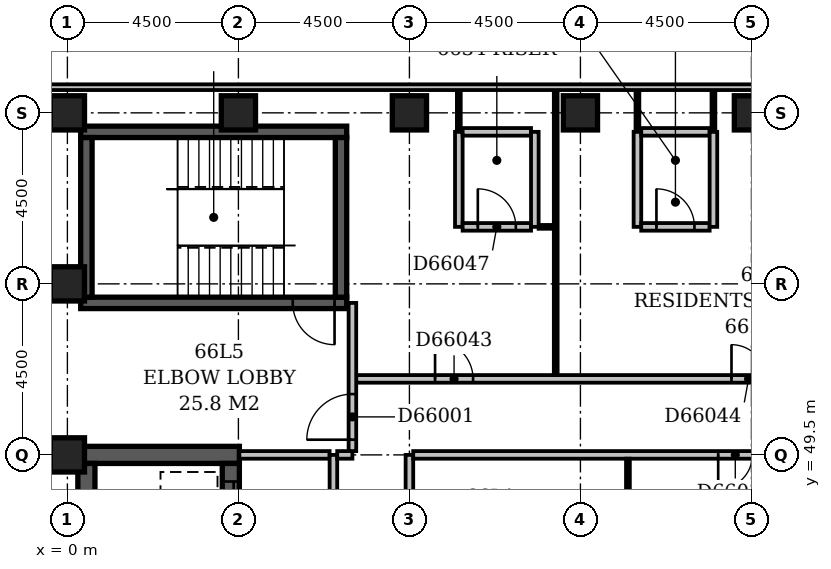
"""IFC4 building model, lengths in metres.
Left out: names, types, materials, properties, quantities, classifications, styles, units other than length and angle.
Written with IfcOpenShell. Run it as: python <this file> out.ifc"""

import sys

from ifc_helpers import new_model, si_unit, direction, frame, frame_2d, origin, origin_2d, place, context, subcontext, project, spatial, rectangle, extrude, element, fill, save


model = new_model("IFC4")
c1 = context("Model", 3, precision=1e-05, world=origin(), true_north=direction((0.0, 1.0)))
c2 = subcontext(c1, "Body", "Model", "MODEL_VIEW")
j1 = project(units=[si_unit("LENGTHUNIT", "METRE"), si_unit("PLANEANGLEUNIT", "RADIAN")], contexts=[c1])
p1 = place(None, origin())
s1 = spatial("IfcSite", under=j1, at=p1, CompositionType="ELEMENT")
p2 = place(p1, origin())
s2 = spatial("IfcBuilding", under=s1, at=p2, CompositionType="ELEMENT")
p3 = place(p2, frame((0.0, 0.0, 254.6)))
s3 = spatial("IfcBuildingStorey", under=s2, at=p3, CompositionType="ELEMENT", Elevation=254.6)
p4 = place(p3, frame((0.275, 49.5, -0.3), z_axis=(0.0, 0.0, 1.0), x_axis=(1.0, 0.0, 0.0)))
e1 = element("IfcWall", 1, at=p4, inside=s3, PredefinedType="SHEAR", context=c2, shape_type="SweptSolid", body=[
    extrude(rectangle(XDim=4.25, YDim=0.45, at=frame_2d((2.125, 0.0))), origin(), (0.0, 0.0, 1.0), 3.45),
])
p5 = place(p3, frame((0.35, 53.5, -0.3), z_axis=(0.0, 0.0, 1.0), x_axis=(1.0, 0.0, 0.0)))
e2 = element("IfcWall", 2, at=p5, inside=s3, PredefinedType="SHEAR", context=c2, shape_type="SweptSolid", body=[
    extrude(rectangle(XDim=7.0, YDim=0.3, at=frame_2d((3.5, 0.0))), origin(), (0.0, 0.0, 1.0), 3.45),
])
p6 = place(p5, frame((5.58, 0.0, 0.3)))
e3 = element("IfcOpeningElement", 3, at=p6, cuts=e2, PredefinedType="OPENING", context=c2, shape_type="SweptSolid", body=[
    extrude(rectangle(XDim=1.1, YDim=2.1, at=frame_2d((0.55, 1.05))), frame((0.0, 0.162, 0.0), z_axis=(0.0, -1.0, 0.0), x_axis=(1.0, 0.0, 0.0)), (0.0, 0.0, 1.0), 0.324),
])
p7 = place(p3, frame((0.35, 58.0, -0.3), z_axis=(0.0, 0.0, 1.0), x_axis=(1.0, 0.0, 0.0)))
e4 = element("IfcWall", 4, at=p7, inside=s3, PredefinedType="SHEAR", context=c2, shape_type="SweptSolid", body=[
    extrude(rectangle(XDim=7.0, YDim=0.3, at=frame_2d((3.5, 0.0))), origin(), (0.0, 0.0, 1.0), 3.45),
])
p8 = place(p3, frame((0.5, 27.15, -0.3), z_axis=(0.0, 0.0, 1.0), x_axis=(0.0, 1.0, 0.0)))
e5 = element("IfcWall", 5, at=p8, inside=s3, PredefinedType="SHEAR", context=c2, shape_type="SweptSolid", body=[
    extrude(rectangle(XDim=22.125, YDim=0.45, at=frame_2d((11.062, 0.0))), origin(), (0.0, 0.0, 1.0), 3.45),
])
p9 = place(p3, frame((0.5, 53.65, -0.3), z_axis=(0.0, 0.0, 1.0), x_axis=(0.0, 1.0, 0.0)))
e6 = element("IfcWall", 6, at=p9, inside=s3, PredefinedType="SHEAR", context=c2, shape_type="SweptSolid", body=[
    extrude(rectangle(XDim=4.2, YDim=0.3, at=frame_2d((2.1, 0.0))), origin(), (0.0, 0.0, 1.0), 3.45),
])
p10 = place(p3, frame((4.3, 27.15, -0.3), z_axis=(0.0, 0.0, 1.0), x_axis=(0.0, 1.0, 0.0)))
e7 = element("IfcWall", 7, at=p10, inside=s3, PredefinedType="SHEAR", context=c2, shape_type="SweptSolid", body=[
    extrude(rectangle(XDim=22.125, YDim=0.45, at=frame_2d((11.062, 0.0))), origin(), (0.0, 0.0, 1.0), 3.45),
])
p11 = place(p10, frame((3.05, 0.0, 0.3)))
e8 = element("IfcOpeningElement", 8, at=p11, cuts=e7, PredefinedType="OPENING", context=c2, shape_type="SweptSolid", body=[
    extrude(rectangle(XDim=1.1, YDim=2.1, at=frame_2d((0.55, 1.05))), frame((0.0, 0.237, 0.0), z_axis=(0.0, -1.0, 0.0), x_axis=(1.0, 0.0, 0.0)), (0.0, 0.0, 1.0), 0.474),
])
p12 = place(p10, frame((0.55, 0.0, 0.3)))
e9 = element("IfcOpeningElement", 9, at=p12, cuts=e7, PredefinedType="OPENING", context=c2, shape_type="SweptSolid", body=[
    extrude(rectangle(XDim=1.1, YDim=2.1, at=frame_2d((0.55, 1.05))), frame((0.0, 0.237, 0.0), z_axis=(0.0, -1.0, 0.0), x_axis=(1.0, 0.0, 0.0)), (0.0, 0.0, 1.0), 0.474),
])
p13 = place(p10, frame((20.55, 0.0, 0.3)))
e10 = element("IfcOpeningElement", 10, at=p13, cuts=e7, PredefinedType="OPENING", context=c2, shape_type="SweptSolid", body=[
    extrude(rectangle(XDim=1.1, YDim=2.1, at=frame_2d((0.55, 1.05))), frame((0.0, 0.237, 0.0), z_axis=(0.0, -1.0, 0.0), x_axis=(1.0, 0.0, 0.0)), (0.0, 0.0, 1.0), 0.474),
])
p14 = place(p10, frame((18.05, 0.0, 0.3)))
e11 = element("IfcOpeningElement", 11, at=p14, cuts=e7, PredefinedType="OPENING", context=c2, shape_type="SweptSolid", body=[
    extrude(rectangle(XDim=1.1, YDim=2.1, at=frame_2d((0.55, 1.05))), frame((0.0, 0.237, 0.0), z_axis=(0.0, -1.0, 0.0), x_axis=(1.0, 0.0, 0.0)), (0.0, 0.0, 1.0), 0.474),
])
p15 = place(p10, frame((15.55, 0.0, 0.3)))
e12 = element("IfcOpeningElement", 12, at=p15, cuts=e7, PredefinedType="OPENING", context=c2, shape_type="SweptSolid", body=[
    extrude(rectangle(XDim=1.1, YDim=2.1, at=frame_2d((0.55, 1.05))), frame((0.0, 0.237, 0.0), z_axis=(0.0, -1.0, 0.0), x_axis=(1.0, 0.0, 0.0)), (0.0, 0.0, 1.0), 0.474),
])
p16 = place(p10, frame((13.05, 0.0, 0.3)))
e13 = element("IfcOpeningElement", 13, at=p16, cuts=e7, PredefinedType="OPENING", context=c2, shape_type="SweptSolid", body=[
    extrude(rectangle(XDim=1.1, YDim=2.1, at=frame_2d((0.55, 1.05))), frame((0.0, 0.237, 0.0), z_axis=(0.0, -1.0, 0.0), x_axis=(1.0, 0.0, 0.0)), (0.0, 0.0, 1.0), 0.474),
])
p17 = place(p10, frame((10.55, 0.0, 0.3)))
e14 = element("IfcOpeningElement", 14, at=p17, cuts=e7, PredefinedType="OPENING", context=c2, shape_type="SweptSolid", body=[
    extrude(rectangle(XDim=1.1, YDim=2.1, at=frame_2d((0.55, 1.05))), frame((0.0, 0.237, 0.0), z_axis=(0.0, -1.0, 0.0), x_axis=(1.0, 0.0, 0.0)), (0.0, 0.0, 1.0), 0.474),
])
p18 = place(p10, frame((8.05, 0.0, 0.3)))
e15 = element("IfcOpeningElement", 15, at=p18, cuts=e7, PredefinedType="OPENING", context=c2, shape_type="SweptSolid", body=[
    extrude(rectangle(XDim=1.1, YDim=2.1, at=frame_2d((0.55, 1.05))), frame((0.0, 0.237, 0.0), z_axis=(0.0, -1.0, 0.0), x_axis=(1.0, 0.0, 0.0)), (0.0, 0.0, 1.0), 0.474),
])
p19 = place(p10, frame((5.55, 0.0, 0.3)))
e16 = element("IfcOpeningElement", 16, at=p19, cuts=e7, PredefinedType="OPENING", context=c2, shape_type="SweptSolid", body=[
    extrude(rectangle(XDim=1.1, YDim=2.1, at=frame_2d((0.55, 1.05))), frame((0.0, 0.237, 0.0), z_axis=(0.0, -1.0, 0.0), x_axis=(1.0, 0.0, 0.0)), (0.0, 0.0, 1.0), 0.474),
])
p20 = place(p3, frame((7.2, 53.65, -0.3), z_axis=(0.0, 0.0, 1.0), x_axis=(0.0, 1.0, 0.0)))
e17 = element("IfcWall", 17, at=p20, inside=s3, PredefinedType="SHEAR", context=c2, shape_type="SweptSolid", body=[
    extrude(rectangle(XDim=4.2, YDim=0.3, at=frame_2d((2.1, 0.0))), origin(), (0.0, 0.0, 1.0), 3.45),
])
for number, where, z_axis, x_axis in (
    (18, (0.0, 49.5, -0.3), (0.0, 0.0, 1.0), (1.0, 0.0, 0.0)),
    (19, (0.0, 54.0, -0.3), (0.0, 0.0, 1.0), (1.0, 0.0, 0.0)),
    (20, (0.0, 58.5, -0.3), (0.0, 0.0, 1.0), (1.0, 0.0, 0.0)),
    (21, (4.5, 58.5, -0.3), (0.0, 0.0, 1.0), (1.0, 0.0, 0.0)),
    (22, (9.0, 58.5, -0.3), (0.0, 0.0, 1.0), (1.0, 0.0, 0.0)),
    (23, (13.5, 58.5, -0.3), (0.0, 0.0, 1.0), (1.0, 0.0, 0.0)),
    (24, (18.0, 58.5, -0.3), (0.0, 0.0, 1.0), (1.0, 0.0, 0.0)),
):
    element("IfcColumn", number, at=place(p3, frame(where, z_axis=z_axis, x_axis=x_axis)), inside=s3, PredefinedType="COLUMN", context=c2, shape_type="SweptSolid", body=[
        extrude(rectangle(XDim=0.9, YDim=0.9, at=origin_2d()), origin(), (0.0, 0.0, 1.0), 3.45),
    ])
p21 = place(p3, frame((45.6, 59.175, 0.0), z_axis=(0.0, 0.0, 1.0), x_axis=(-1.0, 0.0, 0.0)))
e25 = element("IfcWall", 25, at=p21, inside=s3, PredefinedType="STANDARD", context=c2, shape_type="SweptSolid", body=[
    extrude(rectangle(XDim=46.35, YDim=0.15, at=frame_2d((23.175, 0.0))), origin(), (0.0, 0.0, 1.0), 2.7),
])
p22 = place(p21, frame((15.734, 0.0, 0.6)))
e26 = element("IfcOpeningElement", 26, at=p22, cuts=e25, PredefinedType="OPENING", context=c2, shape_type="SweptSolid", body=[
    extrude(rectangle(XDim=2.1, YDim=1.8, at=frame_2d((1.05, 0.9))), frame((0.0, 0.087, 0.0), z_axis=(0.0, -1.0, 0.0), x_axis=(1.0, 0.0, 0.0)), (0.0, 0.0, 1.0), 0.174),
])
p23 = place(p3, frame((7.0, 34.6, 0.0), z_axis=(0.0, 0.0, 1.0), x_axis=(0.0, 1.0, 0.0)))
e27 = element("IfcWall", 27, at=p23, inside=s3, PredefinedType="PARTITIONING", context=c2, shape_type="SweptSolid", body=[
    extrude(rectangle(XDim=14.9, YDim=0.2, at=frame_2d((7.45, 0.0))), origin(), (0.0, 0.0, 1.0), 3.15),
])
p24 = place(p23, frame((2.8, 0.0, 0.0)))
e28 = element("IfcOpeningElement", 28, at=p24, cuts=e27, PredefinedType="OPENING", context=c2, shape_type="SweptSolid", body=[
    extrude(rectangle(XDim=1.2, YDim=2.1, at=frame_2d((0.6, 1.05))), frame((0.0, 0.112, 0.0), z_axis=(0.0, -1.0, 0.0), x_axis=(1.0, 0.0, 0.0)), (0.0, 0.0, 1.0), 0.224),
])
p25 = place(p23, frame((9.8, 0.0, 0.0)))
e29 = element("IfcOpeningElement", 29, at=p25, cuts=e27, PredefinedType="OPENING", context=c2, shape_type="SweptSolid", body=[
    extrude(rectangle(XDim=1.2, YDim=2.1, at=frame_2d((0.6, 1.05))), frame((0.0, 0.112, 0.0), z_axis=(0.0, -1.0, 0.0), x_axis=(1.0, 0.0, 0.0)), (0.0, 0.0, 1.0), 0.224),
])
p26 = place(p3, frame((4.525, 49.5, 0.0), z_axis=(0.0, 0.0, 1.0), x_axis=(1.0, 0.0, 0.0)))
e30 = element("IfcWall", 30, at=p26, inside=s3, PredefinedType="PARTITIONING", context=c2, shape_type="SweptSolid", body=[
    extrude(rectangle(XDim=2.375, YDim=0.2, at=frame_2d((1.188, 0.0))), origin(), (0.0, 0.0, 1.0), 3.15),
])
p27 = place(p3, frame((7.1, 49.5, 0.0), z_axis=(0.0, 0.0, 1.0), x_axis=(1.0, 0.0, 0.0)))
e31 = element("IfcWall", 31, at=p27, inside=s3, PredefinedType="PARTITIONING", context=c2, shape_type="SweptSolid", body=[
    extrude(rectangle(XDim=0.4, YDim=0.2, at=frame_2d((0.2, 0.0))), origin(), (0.0, 0.0, 1.0), 3.15),
])
p28 = place(p3, frame((7.5, 49.6, 0.0), z_axis=(0.0, 0.0, 1.0), x_axis=(0.0, 1.0, 0.0)))
e32 = element("IfcWall", 32, at=p28, inside=s3, PredefinedType="PARTITIONING", context=c2, shape_type="SweptSolid", body=[
    extrude(rectangle(XDim=3.9, YDim=0.2, at=frame_2d((1.95, 0.0))), origin(), (0.0, 0.0, 1.0), 3.15),
])
p29 = place(p28, frame((0.3, 0.0, 0.0)))
e33 = element("IfcOpeningElement", 33, at=p29, cuts=e32, PredefinedType="OPENING", context=c2, shape_type="SweptSolid", body=[
    extrude(rectangle(XDim=1.2, YDim=2.1, at=frame_2d((0.6, 1.05))), frame((0.0, 0.112, 0.0), z_axis=(0.0, -1.0, 0.0), x_axis=(1.0, 0.0, 0.0)), (0.0, 0.0, 1.0), 0.224),
])
p30 = place(p3, frame((9.0, 38.0, 0.0), z_axis=(0.0, 0.0, 1.0), x_axis=(0.0, 1.0, 0.0)))
e34 = element("IfcWall", 34, at=p30, inside=s3, PredefinedType="PARTITIONING", context=c2, shape_type="SweptSolid", body=[
    extrude(rectangle(XDim=11.5, YDim=0.2, at=frame_2d((5.75, 0.0))), origin(), (0.0, 0.0, 1.0), 3.15),
])
p31 = place(p30, frame((1.5, 0.0, 0.0)))
e35 = element("IfcOpeningElement", 35, at=p31, cuts=e34, PredefinedType="OPENING", context=c2, shape_type="SweptSolid", body=[
    extrude(rectangle(XDim=0.9, YDim=2.1, at=frame_2d((0.45, 1.05))), frame((0.0, 0.112, 0.0), z_axis=(0.0, -1.0, 0.0), x_axis=(1.0, 0.0, 0.0)), (0.0, 0.0, 1.0), 0.224),
])
p32 = place(p30, frame((7.25, 0.0, 0.0)))
e36 = element("IfcOpeningElement", 36, at=p32, cuts=e34, PredefinedType="OPENING", context=c2, shape_type="SweptSolid", body=[
    extrude(rectangle(XDim=0.9, YDim=2.1, at=frame_2d((0.45, 1.05))), frame((0.0, 0.112, 0.0), z_axis=(0.0, -1.0, 0.0), x_axis=(1.0, 0.0, 0.0)), (0.0, 0.0, 1.0), 0.224),
])
p33 = place(p3, frame((14.75, 42.05, 0.0), z_axis=(0.0, 0.0, 1.0), x_axis=(0.0, 1.0, 0.0)))
e37 = element("IfcWall", 37, at=p33, inside=s3, PredefinedType="PARTITIONING", context=c2, shape_type="SweptSolid", body=[
    extrude(rectangle(XDim=7.35, YDim=0.1, at=frame_2d((3.675, 0.0))), origin(), (0.0, 0.0, 1.0), 3.15),
])
p34 = place(p3, frame((9.1, 49.5, 0.0), z_axis=(0.0, 0.0, 1.0), x_axis=(1.0, 0.0, 0.0)))
e38 = element("IfcWall", 38, at=p34, inside=s3, PredefinedType="PARTITIONING", context=c2, shape_type="SweptSolid", body=[
    extrude(rectangle(XDim=11.3, YDim=0.2, at=frame_2d((5.65, 0.0))), origin(), (0.0, 0.0, 1.0), 3.15),
])
p35 = place(p34, frame((8.025, 0.0, 0.0)))
e39 = element("IfcOpeningElement", 39, at=p35, cuts=e38, PredefinedType="OPENING", context=c2, shape_type="SweptSolid", body=[
    extrude(rectangle(XDim=0.9, YDim=2.1, at=frame_2d((0.45, 1.05))), frame((0.0, 0.112, 0.0), z_axis=(0.0, -1.0, 0.0), x_axis=(1.0, 0.0, 0.0)), (0.0, 0.0, 1.0), 0.224),
])
p36 = place(p3, frame((7.6, 51.5, 0.0), z_axis=(0.0, 0.0, 1.0), x_axis=(1.0, 0.0, 0.0)))
e40 = element("IfcWall", 40, at=p36, inside=s3, PredefinedType="PARTITIONING", context=c2, shape_type="SweptSolid", body=[
    extrude(rectangle(XDim=15.3, YDim=0.2, at=frame_2d((7.65, 0.0))), origin(), (0.0, 0.0, 1.0), 3.15),
])
p37 = place(p36, frame((2.075, 0.0, 0.0)))
e41 = element("IfcOpeningElement", 41, at=p37, cuts=e40, PredefinedType="OPENING", context=c2, shape_type="SweptSolid", body=[
    extrude(rectangle(XDim=1.0, YDim=2.1, at=frame_2d((0.5, 1.05))), frame((0.0, 0.112, 0.0), z_axis=(0.0, -1.0, 0.0), x_axis=(1.0, 0.0, 0.0)), (0.0, 0.0, 1.0), 0.224),
])
p38 = place(p36, frame((9.875, 0.0, 0.0)))
e42 = element("IfcOpeningElement", 42, at=p38, cuts=e40, PredefinedType="OPENING", context=c2, shape_type="SweptSolid", body=[
    extrude(rectangle(XDim=0.9, YDim=2.1, at=frame_2d((0.45, 1.05))), frame((0.0, 0.112, 0.0), z_axis=(0.0, -1.0, 0.0), x_axis=(1.0, 0.0, 0.0)), (0.0, 0.0, 1.0), 0.224),
])
p39 = place(p3, frame((12.85, 51.6, 0.0), z_axis=(0.0, 0.0, 1.0), x_axis=(0.0, 1.0, 0.0)))
e43 = element("IfcWall", 43, at=p39, inside=s3, PredefinedType="PARTITIONING", context=c2, shape_type="SweptSolid", body=[
    extrude(rectangle(XDim=7.5, YDim=0.1, at=frame_2d((3.75, 0.0))), origin(), (0.0, 0.0, 1.0), 3.15),
])
p40 = place(p3, frame((10.3, 55.5, 0.0), z_axis=(0.0, 0.0, 1.0), x_axis=(0.0, 1.0, 0.0)))
e44 = element("IfcWall", 44, at=p40, inside=s3, PredefinedType="PARTITIONING", context=c2, shape_type="SweptSolid", body=[
    extrude(rectangle(XDim=2.5, YDim=0.2, at=frame_2d((1.25, 0.0))), origin(), (0.0, 0.0, 1.0), 3.15),
])
p41 = place(p3, frame((10.4, 55.5, 0.0), z_axis=(0.0, 0.0, 1.0), x_axis=(1.0, 0.0, 0.0)))
e45 = element("IfcWall", 45, at=p41, inside=s3, PredefinedType="PARTITIONING", context=c2, shape_type="SweptSolid", body=[
    extrude(rectangle(XDim=1.8, YDim=0.2, at=frame_2d((0.9, 0.0))), origin(), (0.0, 0.0, 1.0), 3.15),
])
p42 = place(p41, frame((0.4, 0.0, 0.0)))
e46 = element("IfcOpeningElement", 46, at=p42, cuts=e45, PredefinedType="OPENING", context=c2, shape_type="SweptSolid", body=[
    extrude(rectangle(XDim=1.0, YDim=2.1, at=frame_2d((0.5, 1.05))), frame((0.0, 0.112, 0.0), z_axis=(0.0, -1.0, 0.0), x_axis=(1.0, 0.0, 0.0)), (0.0, 0.0, 1.0), 0.224),
])
p43 = place(p3, frame((12.3, 55.5, 0.0), z_axis=(0.0, 0.0, 1.0), x_axis=(0.0, 1.0, 0.0)))
e47 = element("IfcWall", 47, at=p43, inside=s3, PredefinedType="PARTITIONING", context=c2, shape_type="SweptSolid", body=[
    extrude(rectangle(XDim=2.5, YDim=0.2, at=frame_2d((1.25, 0.0))), origin(), (0.0, 0.0, 1.0), 3.15),
])
p44 = place(p3, frame((12.4, 55.5, 0.0), z_axis=(0.0, 0.0, 1.0), x_axis=(1.0, 0.0, 0.0)))
e48 = element("IfcWall", 48, at=p44, inside=s3, PredefinedType="PARTITIONING", context=c2, shape_type="SweptSolid", body=[
    extrude(rectangle(XDim=0.4, YDim=0.1, at=frame_2d((0.2, 0.0))), origin(), (0.0, 0.0, 1.0), 3.15),
])
p45 = place(p3, frame((15.0, 55.5, 0.0), z_axis=(0.0, 0.0, 1.0), x_axis=(0.0, 1.0, 0.0)))
e49 = element("IfcWall", 49, at=p45, inside=s3, PredefinedType="PARTITIONING", context=c2, shape_type="SweptSolid", body=[
    extrude(rectangle(XDim=2.5, YDim=0.2, at=frame_2d((1.25, 0.0))), origin(), (0.0, 0.0, 1.0), 3.15),
])
p46 = place(p3, frame((15.1, 55.5, 0.0), z_axis=(0.0, 0.0, 1.0), x_axis=(1.0, 0.0, 0.0)))
e50 = element("IfcWall", 50, at=p46, inside=s3, PredefinedType="PARTITIONING", context=c2, shape_type="SweptSolid", body=[
    extrude(rectangle(XDim=1.8, YDim=0.2, at=frame_2d((0.9, 0.0))), origin(), (0.0, 0.0, 1.0), 3.15),
])
p47 = place(p46, frame((0.4, 0.0, 0.0)))
e51 = element("IfcOpeningElement", 51, at=p47, cuts=e50, PredefinedType="OPENING", context=c2, shape_type="SweptSolid", body=[
    extrude(rectangle(XDim=1.0, YDim=2.1, at=frame_2d((0.5, 1.05))), frame((0.0, 0.112, 0.0), z_axis=(0.0, -1.0, 0.0), x_axis=(1.0, 0.0, 0.0)), (0.0, 0.0, 1.0), 0.224),
])
p48 = place(p3, frame((17.0, 55.5, 0.0), z_axis=(0.0, 0.0, 1.0), x_axis=(0.0, 1.0, 0.0)))
e52 = element("IfcWall", 52, at=p48, inside=s3, PredefinedType="PARTITIONING", context=c2, shape_type="SweptSolid", body=[
    extrude(rectangle(XDim=2.5, YDim=0.2, at=frame_2d((1.25, 0.0))), origin(), (0.0, 0.0, 1.0), 3.15),
])
p49 = place(p3, frame((10.3, 58.0, 0.0), z_axis=(0.0, 0.0, 1.0), x_axis=(0.0, 1.0, 0.0)))
e53 = element("IfcWall", 53, at=p49, inside=s3, PredefinedType="PARTITIONING", context=c2, shape_type="SweptSolid", body=[
    extrude(rectangle(XDim=1.1, YDim=0.1, at=frame_2d((0.55, 0.0))), origin(), (0.0, 0.0, 1.0), 3.15),
])
p50 = place(p3, frame((10.4, 58.0, 0.0), z_axis=(0.0, 0.0, 1.0), x_axis=(1.0, 0.0, 0.0)))
e54 = element("IfcWall", 54, at=p50, inside=s3, PredefinedType="PARTITIONING", context=c2, shape_type="SweptSolid", body=[
    extrude(rectangle(XDim=1.8, YDim=0.2, at=frame_2d((0.9, 0.0))), origin(), (0.0, 0.0, 1.0), 3.15),
])
p51 = place(p3, frame((15.0, 58.0, 0.0), z_axis=(0.0, 0.0, 1.0), x_axis=(0.0, 1.0, 0.0)))
e55 = element("IfcWall", 55, at=p51, inside=s3, PredefinedType="PARTITIONING", context=c2, shape_type="SweptSolid", body=[
    extrude(rectangle(XDim=1.1, YDim=0.1, at=frame_2d((0.55, 0.0))), origin(), (0.0, 0.0, 1.0), 3.15),
])
p52 = place(p3, frame((15.1, 58.0, 0.0), z_axis=(0.0, 0.0, 1.0), x_axis=(1.0, 0.0, 0.0)))
e56 = element("IfcWall", 56, at=p52, inside=s3, PredefinedType="PARTITIONING", context=c2, shape_type="SweptSolid", body=[
    extrude(rectangle(XDim=1.8, YDim=0.2, at=frame_2d((0.9, 0.0))), origin(), (0.0, 0.0, 1.0), 3.15),
])
p53 = place(p3, frame((17.0, 58.0, 0.0), z_axis=(0.0, 0.0, 1.0), x_axis=(0.0, 1.0, 0.0)))
e57 = element("IfcWall", 57, at=p53, inside=s3, PredefinedType="PARTITIONING", context=c2, shape_type="SweptSolid", body=[
    extrude(rectangle(XDim=1.1, YDim=0.1, at=frame_2d((0.55, 0.0))), origin(), (0.0, 0.0, 1.0), 3.15),
])
p54 = place(p29, origin())
e58 = element("IfcDoor", 58, at=p54, inside=s3, OperationType="SINGLE_SWING_LEFT", PredefinedType="DOOR", context=c2, shape_type="SweptSolid", body=[
    extrude(rectangle(XDim=1.2, YDim=2.1, at=frame_2d((0.6, 1.05))), frame((0.0, 0.025, 0.0), z_axis=(0.0, -1.0, 0.0), x_axis=(1.0, 0.0, 0.0)), (0.0, 0.0, 1.0), 0.05),
])
fill(e33, e58)
p55 = place(p13, origin())
e59 = element("IfcDoor", 59, at=p55, inside=s3, OperationType="SLIDING_TO_LEFT", PredefinedType="DOOR", context=c2, shape_type="SweptSolid", body=[
    extrude(rectangle(XDim=1.1, YDim=2.1, at=frame_2d((0.55, 1.05))), frame((0.0, 0.025, 0.0), z_axis=(0.0, -1.0, 0.0), x_axis=(1.0, 0.0, 0.0)), (0.0, 0.0, 1.0), 0.05),
])
fill(e10, e59)
p56 = place(p6, origin())
e60 = element("IfcDoor", 60, at=p56, inside=s3, OperationType="SINGLE_SWING_RIGHT", PredefinedType="DOOR", context=c2, shape_type="SweptSolid", body=[
    extrude(rectangle(XDim=1.1, YDim=2.1, at=frame_2d((0.55, 1.05))), frame((0.0, 0.025, 0.0), z_axis=(0.0, -1.0, 0.0), x_axis=(1.0, 0.0, 0.0)), (0.0, 0.0, 1.0), 0.05),
])
fill(e3, e60)
p57 = place(p35, frame((0.9, 0.0, 0.0), z_axis=(0.0, 0.0, 1.0), x_axis=(-1.0, 0.0, 0.0)))
e61 = element("IfcDoor", 61, at=p57, inside=s3, OperationType="SINGLE_SWING_RIGHT", PredefinedType="DOOR", context=c2, shape_type="SweptSolid", body=[
    extrude(rectangle(XDim=0.9, YDim=2.1, at=frame_2d((0.45, 1.05))), frame((0.0, 0.025, 0.0), z_axis=(0.0, -1.0, 0.0), x_axis=(1.0, 0.0, 0.0)), (0.0, 0.0, 1.0), 0.05),
])
fill(e39, e61)
p58 = place(p37, origin())
e62 = element("IfcDoor", 62, at=p58, inside=s3, OperationType="SINGLE_SWING_LEFT", PredefinedType="DOOR", context=c2, shape_type="SweptSolid", body=[
    extrude(rectangle(XDim=1.0, YDim=2.1, at=frame_2d((0.5, 1.05))), frame((0.0, 0.025, 0.0), z_axis=(0.0, -1.0, 0.0), x_axis=(1.0, 0.0, 0.0)), (0.0, 0.0, 1.0), 0.05),
])
fill(e41, e62)
p59 = place(p38, origin())
e63 = element("IfcDoor", 63, at=p59, inside=s3, OperationType="SINGLE_SWING_LEFT", PredefinedType="DOOR", context=c2, shape_type="SweptSolid", body=[
    extrude(rectangle(XDim=0.9, YDim=2.1, at=frame_2d((0.45, 1.05))), frame((0.0, 0.025, 0.0), z_axis=(0.0, -1.0, 0.0), x_axis=(1.0, 0.0, 0.0)), (0.0, 0.0, 1.0), 0.05),
])
fill(e42, e63)
p60 = place(p42, origin())
e64 = element("IfcDoor", 64, at=p60, inside=s3, OperationType="SINGLE_SWING_LEFT", PredefinedType="DOOR", context=c2, shape_type="SweptSolid", body=[
    extrude(rectangle(XDim=1.0, YDim=2.1, at=frame_2d((0.5, 1.05))), frame((0.0, 0.025, 0.0), z_axis=(0.0, -1.0, 0.0), x_axis=(1.0, 0.0, 0.0)), (0.0, 0.0, 1.0), 0.05),
])
fill(e46, e64)
p61 = place(p47, origin())
e65 = element("IfcDoor", 65, at=p61, inside=s3, OperationType="SINGLE_SWING_LEFT", PredefinedType="DOOR", context=c2, shape_type="SweptSolid", body=[
    extrude(rectangle(XDim=1.0, YDim=2.1, at=frame_2d((0.5, 1.05))), frame((0.0, 0.025, 0.0), z_axis=(0.0, -1.0, 0.0), x_axis=(1.0, 0.0, 0.0)), (0.0, 0.0, 1.0), 0.05),
])
fill(e51, e65)
save(model, sys.argv[1])
